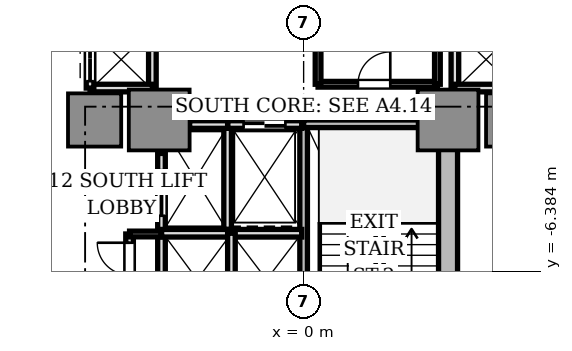
"""IFC4 building model, lengths in metres.
Left out: names, types, materials, properties, quantities, classifications, styles, units other than length and angle.
Written with IfcOpenShell. Run it as: python <this file> out.ifc"""

import sys

from ifc_helpers import new_model, si_unit, direction, frame, frame_2d, origin, origin_2d, place, context, subcontext, project, spatial, rectangle, extrude, source, transform, mapped, element, fill, save


model = new_model("IFC4")
c1 = context("Model", 3, precision=1e-05, world=origin(), true_north=direction((0.0, 1.0)))
c2 = subcontext(c1, "Body", "Model", "MODEL_VIEW")
j1 = project(units=[si_unit("LENGTHUNIT", "METRE"), si_unit("PLANEANGLEUNIT", "RADIAN")], contexts=[c1])
p1 = place(None, origin())
s1 = spatial("IfcSite", under=j1, at=p1, CompositionType="ELEMENT")
p2 = place(p1, origin())
s2 = spatial("IfcBuilding", under=s1, at=p2, CompositionType="ELEMENT")
p3 = place(p2, frame((0.0, 0.0, 46.55)))
s3 = spatial("IfcBuildingStorey", under=s2, at=p3, CompositionType="ELEMENT", Elevation=46.55)
p4 = place(p3, frame((3.8, -9.75, 0.0), z_axis=(0.0, 0.0, 1.0), x_axis=(0.0, 1.0, 0.0)))
e1 = element("IfcWall", 1, at=p4, inside=s3, PredefinedType="SHEAR", context=c2, shape_type="SweptSolid", body=[
    extrude(rectangle(XDim=6.9, YDim=0.5, at=frame_2d((3.45, 0.0))), origin(), (0.0, 0.0, 1.0), 4.26),
])
m1 = source(origin(), c2, "Body", "SweptSolid", [
    extrude(rectangle(XDim=1.6, YDim=1.6, at=origin_2d()), origin(), (0.0, 0.0, 1.0), 4.26),
])
for number, where, z_axis, x_axis in (
    (2, (-3.8, -2.4, 0.0), (0.0, 0.0, 1.0), (1.0, 0.0, 0.0)),
    (3, (3.8, -2.4, 0.0), (0.0, 0.0, 1.0), (1.0, 0.0, 0.0)),
):
    element("IfcColumn", number, at=place(p3, frame(where, z_axis=z_axis, x_axis=x_axis)), inside=s3, PredefinedType="COLUMN", context=c2, shape_type="MappedRepresentation", body=[
        mapped(m1, transform((0.0, 0.0, 0.0), scale=1.0)),
    ])
m2 = source(origin(), c2, "Body", "SweptSolid", [
    extrude(rectangle(XDim=1.4, YDim=1.4, at=origin_2d()), origin(), (0.0, 0.0, 1.0), 4.26),
])
for number, where, z_axis, x_axis in (
    (4, (5.5, -2.4, 0.0), (0.0, 0.0, 1.0), (1.0, 0.0, 0.0)),
    (5, (-5.5, -2.4, 0.0), (0.0, 0.0, 1.0), (1.0, 0.0, 0.0)),
):
    element("IfcColumn", number, at=place(p3, frame(where, z_axis=z_axis, x_axis=x_axis)), inside=s3, PredefinedType="COLUMN", context=c2, shape_type="MappedRepresentation", body=[
        mapped(m2, transform((0.0, 0.0, 0.0), scale=1.0)),
    ])
p5 = place(p3, frame((0.0, -10.18, 0.0), z_axis=(0.0, 0.0, 1.0), x_axis=(0.0, 1.0, 0.0)))
e6 = element("IfcWall", 6, at=p5, inside=s3, PredefinedType="SOLIDWALL", context=c2, shape_type="SweptSolid", body=[
    extrude(rectangle(XDim=7.68, YDim=0.2, at=frame_2d((3.84, 0.0))), origin(), (0.0, 0.0, 1.0), 4.26),
])
p6 = place(p5, frame((0.28, 0.0, 0.0)))
e7 = element("IfcOpeningElement", 7, at=p6, cuts=e6, PredefinedType="OPENING", context=c2, shape_type="SweptSolid", body=[
    extrude(rectangle(XDim=1.1, YDim=2.15, at=frame_2d((0.55, 1.075))), frame((0.0, 0.11, 0.0), z_axis=(0.0, -1.0, 0.0), x_axis=(1.0, 0.0, 0.0)), (0.0, 0.0, 1.0), 0.22),
])
p7 = place(p3, frame((0.0, -2.5, 0.0), z_axis=(0.0, 0.0, 1.0), x_axis=(1.0, 0.0, 0.0)))
e8 = element("IfcWall", 8, at=p7, inside=s3, PredefinedType="SOLIDWALL", context=c2, shape_type="SweptSolid", body=[
    extrude(rectangle(XDim=3.72, YDim=0.2, at=frame_2d((1.86, 0.0))), origin(), (0.0, 0.0, 1.0), 4.26),
])
p8 = place(p3, frame((-2.0, -5.28, 0.0), z_axis=(0.0, 0.0, 1.0), x_axis=(0.0, 1.0, 0.0)))
e9 = element("IfcWall", 9, at=p8, inside=s3, PredefinedType="SOLIDWALL", context=c2, shape_type="SweptSolid", body=[
    extrude(rectangle(XDim=2.78, YDim=0.2, at=frame_2d((1.39, 0.0))), origin(), (0.0, 0.0, 1.0), 3.81),
])
p9 = place(p3, frame((-2.0, -2.52, 0.0), z_axis=(0.0, 0.0, 1.0), x_axis=(1.0, 0.0, 0.0)))
e10 = element("IfcWall", 10, at=p9, inside=s3, PredefinedType="SOLIDWALL", context=c2, shape_type="SweptSolid", body=[
    extrude(rectangle(XDim=1.95, YDim=0.2, at=frame_2d((0.975, 0.0))), origin(), (0.0, 0.0, 1.0), 3.81),
])
p10 = place(p9, frame((0.42, 0.0, 0.0)))
e11 = element("IfcOpeningElement", 11, at=p10, cuts=e10, PredefinedType="OPENING", context=c2, shape_type="SweptSolid", body=[
    extrude(rectangle(XDim=1.1, YDim=2.2, at=frame_2d((0.55, 1.1))), frame((0.0, 0.11, 0.0), z_axis=(0.0, -1.0, 0.0), x_axis=(1.0, 0.0, 0.0)), (0.0, 0.0, 1.0), 0.22),
])
p11 = place(p3, frame((-3.0, -2.52, 0.0), z_axis=(0.0, 0.0, 1.0), x_axis=(1.0, 0.0, 0.0)))
e12 = element("IfcWall", 12, at=p11, inside=s3, PredefinedType="SOLIDWALL", context=c2, shape_type="SweptSolid", body=[
    extrude(rectangle(XDim=1.0, YDim=0.2, at=frame_2d((0.5, 0.0))), origin(), (0.0, 0.0, 1.0), 3.81),
])
p12 = place(p3, frame((-3.74, -5.36, 0.0), z_axis=(0.0, 0.0, 1.0), x_axis=(0.0, 1.0, 0.0)))
e13 = element("IfcWall", 13, at=p12, inside=s3, PredefinedType="SOLIDWALL", context=c2, shape_type="SweptSolid", body=[
    extrude(rectangle(XDim=2.08, YDim=0.2, at=frame_2d((1.04, 0.0))), origin(), (0.0, 0.0, 1.0), 3.81),
])
p13 = place(p12, frame((0.44, 0.0, 0.0)))
e14 = element("IfcOpeningElement", 14, at=p13, cuts=e13, PredefinedType="OPENING", context=c2, shape_type="SweptSolid", body=[
    extrude(rectangle(XDim=1.2, YDim=2.2, at=frame_2d((0.6, 1.1))), frame((0.0, 0.11, 0.0), z_axis=(0.0, -1.0, 0.0), x_axis=(1.0, 0.0, 0.0)), (0.0, 0.0, 1.0), 0.22),
])
p14 = place(p3, frame((-3.74, -7.86, 0.0), z_axis=(0.0, 0.0, 1.0), x_axis=(0.0, 1.0, 0.0)))
e15 = element("IfcWall", 15, at=p14, inside=s3, PredefinedType="SOLIDWALL", context=c2, shape_type="SweptSolid", body=[
    extrude(rectangle(XDim=2.48, YDim=0.2, at=frame_2d((1.24, 0.0))), origin(), (0.0, 0.0, 1.0), 3.81),
])
p15 = place(p3, frame((-3.74, -5.38, 0.0), z_axis=(0.0, 0.0, 1.0), x_axis=(1.0, 0.0, 0.0)))
e16 = element("IfcWall", 16, at=p15, inside=s3, PredefinedType="SOLIDWALL", context=c2, shape_type="SweptSolid", body=[
    extrude(rectangle(XDim=3.69, YDim=0.2, at=frame_2d((1.845, 0.0))), origin(), (0.0, 0.0, 1.0), 3.81),
])
p16 = place(p3, frame((-1.9, -7.86, 0.0), z_axis=(0.0, 0.0, 1.0), x_axis=(0.0, 1.0, 0.0)))
e17 = element("IfcWall", 17, at=p16, inside=s3, PredefinedType="SOLIDWALL", context=c2, shape_type="SweptSolid", body=[
    extrude(rectangle(XDim=2.48, YDim=0.2, at=frame_2d((1.24, 0.0))), origin(), (0.0, 0.0, 1.0), 3.81),
])
p17 = place(p3, frame((3.98, -1.56, 0.0), z_axis=(0.0, 0.0, 1.0), x_axis=(0.0, 1.0, 0.0)))
e18 = element("IfcWall", 18, at=p17, inside=s3, PredefinedType="SOLIDWALL", context=c2, shape_type="SweptSolid", body=[
    extrude(rectangle(XDim=3.12, YDim=0.2, at=frame_2d((1.56, 0.0))), origin(), (0.0, 0.0, 1.0), 3.33),
])
p18 = place(p3, frame((3.98, -1.56, 0.0), z_axis=(0.0, 0.0, 1.0), x_axis=(1.0, 0.0, 0.0)))
e19 = element("IfcWall", 19, at=p18, inside=s3, PredefinedType="SOLIDWALL", context=c2, shape_type="SweptSolid", body=[
    extrude(rectangle(XDim=1.64, YDim=0.2, at=frame_2d((0.82, 0.0))), origin(), (0.0, 0.0, 1.0), 3.81),
])
p19 = place(p3, frame((-3.98, -1.56, 0.0), z_axis=(0.0, 0.0, 1.0), x_axis=(0.0, 1.0, 0.0)))
e20 = element("IfcWall", 20, at=p19, inside=s3, PredefinedType="SOLIDWALL", context=c2, shape_type="SweptSolid", body=[
    extrude(rectangle(XDim=3.12, YDim=0.2, at=frame_2d((1.56, 0.0))), origin(), (0.0, 0.0, 1.0), 3.33),
])
p20 = place(p3, frame((-5.62, -1.56, 0.0), z_axis=(0.0, 0.0, 1.0), x_axis=(1.0, 0.0, 0.0)))
e21 = element("IfcWall", 21, at=p20, inside=s3, PredefinedType="SOLIDWALL", context=c2, shape_type="SweptSolid", body=[
    extrude(rectangle(XDim=1.64, YDim=0.2, at=frame_2d((0.82, 0.0))), origin(), (0.0, 0.0, 1.0), 3.81),
])
p21 = place(p3, frame((-5.62, -1.56, 0.0), z_axis=(0.0, 0.0, 1.0), x_axis=(0.0, 1.0, 0.0)))
e22 = element("IfcWall", 22, at=p21, inside=s3, PredefinedType="SOLIDWALL", context=c2, shape_type="SweptSolid", body=[
    extrude(rectangle(XDim=1.56, YDim=0.2, at=frame_2d((0.78, 0.0))), origin(), (0.0, 0.0, 1.0), 3.81),
])
p22 = place(p21, frame((0.18, 0.0, 0.0)))
e23 = element("IfcOpeningElement", 23, at=p22, cuts=e22, PredefinedType="OPENING", context=c2, shape_type="SweptSolid", body=[
    extrude(rectangle(XDim=1.2, YDim=2.2, at=frame_2d((0.6, 1.1))), frame((0.0, 0.11, 0.0), z_axis=(0.0, -1.0, 0.0), x_axis=(1.0, 0.0, 0.0)), (0.0, 0.0, 1.0), 0.22),
])
p23 = place(p3, frame((-4.58, -7.86, 0.0), z_axis=(0.0, 0.0, 1.0), x_axis=(0.0, 1.0, 0.0)))
e24 = element("IfcWall", 24, at=p23, inside=s3, PredefinedType="SOLIDWALL", context=c2, shape_type="SweptSolid", body=[
    extrude(rectangle(XDim=2.46, YDim=0.2, at=frame_2d((1.23, 0.0))), origin(), (0.0, 0.0, 1.0), 3.81),
])
p24 = place(p23, frame((0.2, 0.0, 0.0)))
e25 = element("IfcOpeningElement", 25, at=p24, cuts=e24, PredefinedType="OPENING", context=c2, shape_type="SweptSolid", body=[
    extrude(rectangle(XDim=0.85, YDim=2.1, at=frame_2d((0.425, 1.05))), frame((0.0, 0.11, 0.0), z_axis=(0.0, -1.0, 0.0), x_axis=(1.0, 0.0, 0.0)), (0.0, 0.0, 1.0), 0.22),
])
p25 = place(p23, frame((1.38, 0.0, 0.0)))
e26 = element("IfcOpeningElement", 26, at=p25, cuts=e24, PredefinedType="OPENING", context=c2, shape_type="SweptSolid", body=[
    extrude(rectangle(XDim=0.85, YDim=2.1, at=frame_2d((0.425, 1.05))), frame((0.0, 0.11, 0.0), z_axis=(0.0, -1.0, 0.0), x_axis=(1.0, 0.0, 0.0)), (0.0, 0.0, 1.0), 0.22),
])
p26 = place(p3, frame((-4.58, -5.4, 0.0), z_axis=(0.0, 0.0, 1.0), x_axis=(1.0, 0.0, 0.0)))
e27 = element("IfcWall", 27, at=p26, inside=s3, PredefinedType="PARTITIONING", context=c2, shape_type="SweptSolid", body=[
    extrude(rectangle(XDim=0.84, YDim=0.15, at=frame_2d((0.42, 0.0))), origin(), (0.0, 0.0, 1.0), 3.81),
])
p27 = place(p3, frame((0.38, -1.46, 0.0), z_axis=(0.0, 0.0, 1.0), x_axis=(1.0, 0.0, 0.0)))
e28 = element("IfcWall", 28, at=p27, inside=s3, PredefinedType="PARTITIONING", context=c2, shape_type="SweptSolid", body=[
    extrude(rectangle(XDim=3.14, YDim=0.15, at=frame_2d((1.57, 0.0))), origin(), (0.0, 0.0, 1.0), 3.81),
])
p28 = place(p27, frame((1.05, 0.0, 0.0)))
e29 = element("IfcOpeningElement", 29, at=p28, cuts=e28, PredefinedType="OPENING", context=c2, shape_type="SweptSolid", body=[
    extrude(rectangle(XDim=0.85, YDim=2.1, at=frame_2d((0.425, 1.05))), frame((0.0, 0.085, 0.0), z_axis=(0.0, -1.0, 0.0), x_axis=(1.0, 0.0, 0.0)), (0.0, 0.0, 1.0), 0.17),
])
p29 = place(p3, frame((0.38, -1.46, 0.0), z_axis=(0.0, 0.0, 1.0), x_axis=(0.0, 1.0, 0.0)))
e30 = element("IfcWall", 30, at=p29, inside=s3, PredefinedType="PARTITIONING", context=c2, shape_type="SweptSolid", body=[
    extrude(rectangle(XDim=1.36, YDim=0.15, at=frame_2d((0.68, 0.0))), origin(), (0.0, 0.0, 1.0), 3.81),
])
p30 = place(p3, frame((3.52, -1.46, 0.0), z_axis=(0.0, 0.0, 1.0), x_axis=(0.0, 1.0, 0.0)))
e31 = element("IfcWall", 31, at=p30, inside=s3, PredefinedType="PARTITIONING", context=c2, shape_type="SweptSolid", body=[
    extrude(rectangle(XDim=1.36, YDim=0.15, at=frame_2d((0.68, 0.0))), origin(), (0.0, 0.0, 1.0), 3.33),
])
m3 = source(origin(), c2, "Body", "SweptSolid", [
    extrude(rectangle(XDim=1.1, YDim=0.05, at=origin_2d()), origin(), (0.0, 0.0, 1.0), 2.2),
])
p31 = place(p10, frame((0.55, 0.0, 0.0)))
e32 = element("IfcDoor", 32, at=p31, inside=s3, OperationType="DOUBLE_DOOR_SLIDING", PredefinedType="DOOR", context=c2, shape_type="MappedRepresentation", body=[
    mapped(m3, transform((0.0, 0.0, 0.0), scale=1.0)),
])
fill(e11, e32)
m4 = source(origin(), c2, "Body", "SweptSolid", [
    extrude(rectangle(XDim=1.2, YDim=0.05, at=origin_2d()), origin(), (0.0, 0.0, 1.0), 2.2),
])
p32 = place(p13, frame((0.6, 0.0, 0.0)))
e33 = element("IfcDoor", 33, at=p32, inside=s3, OperationType="DOUBLE_DOOR_SLIDING", PredefinedType="DOOR", context=c2, shape_type="MappedRepresentation", body=[
    mapped(m4, transform((0.0, 0.0, 0.0), scale=1.0)),
])
fill(e14, e33)
p33 = place(p22, frame((0.6, 0.0, 0.0)))
e34 = element("IfcDoor", 34, at=p33, inside=s3, OperationType="DOUBLE_DOOR_SLIDING", PredefinedType="DOOR", context=c2, shape_type="MappedRepresentation", body=[
    mapped(m4, transform((0.0, 0.0, 0.0), scale=1.0)),
])
fill(e23, e34)
m5 = source(origin(), c2, "Body", "SweptSolid", [
    extrude(rectangle(XDim=0.85, YDim=0.05, at=origin_2d()), origin(), (0.0, 0.0, 1.0), 2.1),
])
p34 = place(p25, frame((0.425, 0.0, 0.0)))
e35 = element("IfcDoor", 35, at=p34, inside=s3, OperationType="SINGLE_SWING_RIGHT", PredefinedType="DOOR", context=c2, shape_type="MappedRepresentation", body=[
    mapped(m5, transform((0.0, 0.0, 0.0), scale=1.0)),
])
fill(e26, e35)
p35 = place(p28, frame((0.425, 0.0, 0.0)))
e36 = element("IfcDoor", 36, at=p35, inside=s3, OperationType="SINGLE_SWING_RIGHT", PredefinedType="DOOR", context=c2, shape_type="MappedRepresentation", body=[
    mapped(m5, transform((0.0, 0.0, 0.0), scale=1.0)),
])
fill(e29, e36)
save(model, sys.argv[1])
